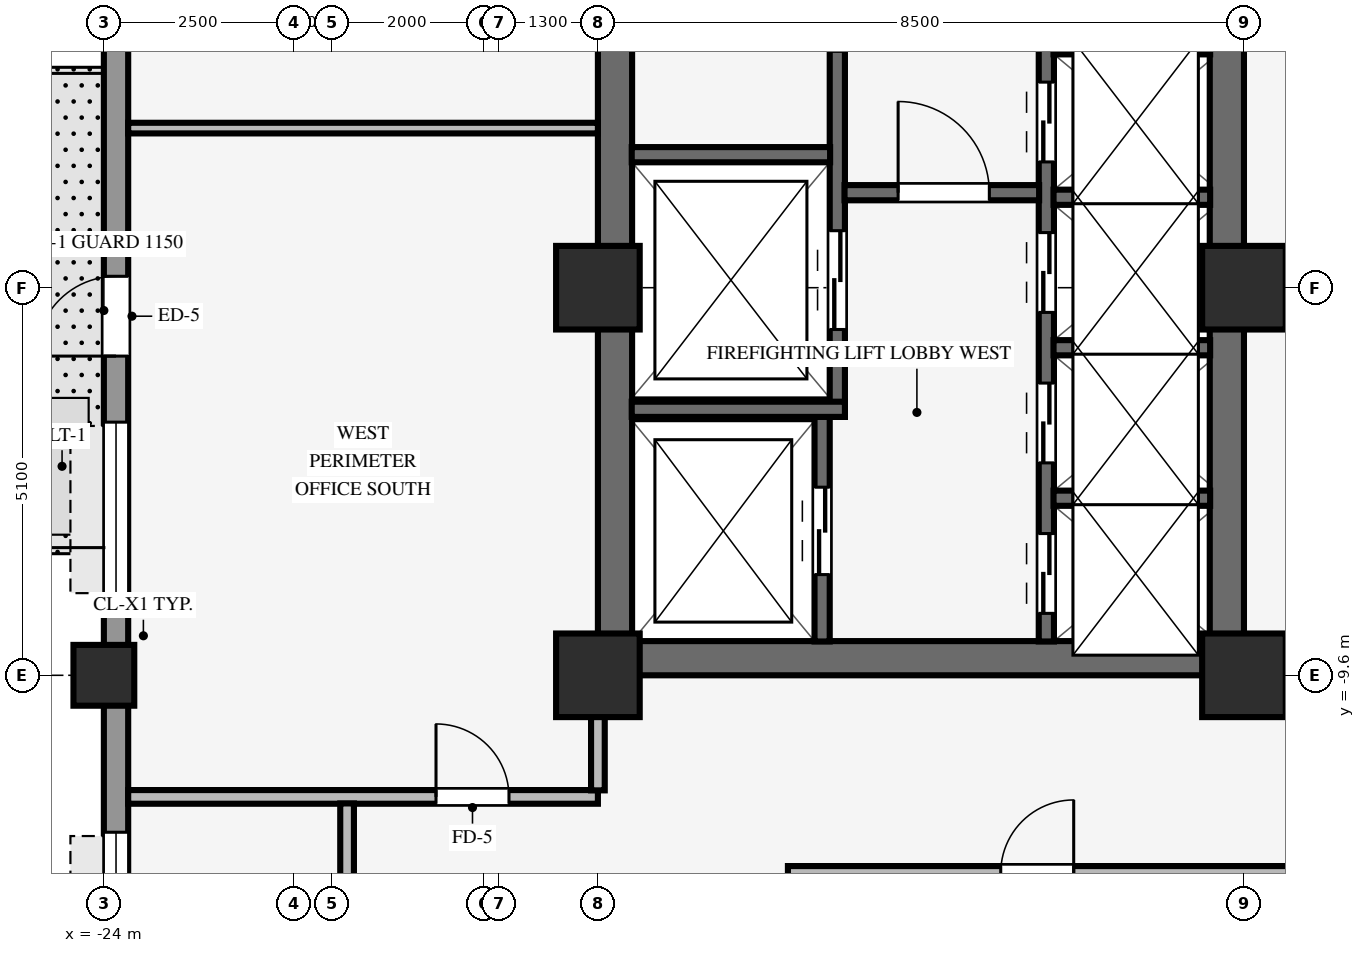
"""IFC4 building model, lengths in metres.
Left out: names, types, materials, properties, quantities, classifications, styles, units other than length and angle.
Written with IfcOpenShell. Run it as: python <this file> out.ifc"""

import sys

from ifc_helpers import new_model, si_unit, direction, frame, frame_2d, origin, origin_2d, place, context, subcontext, project, spatial, rectangle, hollow_rectangle, extrude, source, transform, mapped, element, fill, save


model = new_model("IFC4")
c1 = context("Model", 3, precision=1e-05, world=origin(), true_north=direction((0.0, 1.0)))
c2 = subcontext(c1, "Body", "Model", "MODEL_VIEW")
j1 = project(units=[si_unit("LENGTHUNIT", "METRE"), si_unit("PLANEANGLEUNIT", "RADIAN")], contexts=[c1])
p1 = place(None, origin())
s1 = spatial("IfcSite", under=j1, at=p1, CompositionType="ELEMENT")
p2 = place(p1, origin())
s2 = spatial("IfcBuilding", under=s1, at=p2, CompositionType="ELEMENT")
p3 = place(p2, frame((0.0, 0.0, 89.65)))
s3 = spatial("IfcBuildingStorey", under=s2, at=p3, CompositionType="ELEMENT", Elevation=89.65)
p4 = place(p3, frame((-17.5, -9.375, 0.0), z_axis=(0.0, 0.0, 1.0), x_axis=(1.0, 0.0, 0.0)))
e1 = element("IfcWall", 1, at=p4, inside=s3, PredefinedType="SHEAR", context=c2, shape_type="SweptSolid", body=[
    extrude(rectangle(XDim=8.5, YDim=0.45, at=frame_2d((4.25, 0.0))), origin(), (0.0, 0.0, 1.0), 3.25),
])
p5 = place(p3, frame((-17.275, -9.155, 0.0), z_axis=(0.0, 0.0, 1.0), x_axis=(0.0, 1.0, 0.0)))
e2 = element("IfcWall", 2, at=p5, inside=s3, PredefinedType="SHEAR", context=c2, shape_type="SweptSolid", body=[
    extrude(rectangle(XDim=18.31, YDim=0.45, at=frame_2d((9.155, 0.0))), origin(), (0.0, 0.0, 1.0), 3.25),
])
p6 = place(p3, frame((-9.225, -9.155, 0.0), z_axis=(0.0, 0.0, 1.0), x_axis=(0.0, 1.0, 0.0)))
e3 = element("IfcWall", 3, at=p6, inside=s3, PredefinedType="SHEAR", context=c2, shape_type="SweptSolid", body=[
    extrude(rectangle(XDim=18.31, YDim=0.45, at=frame_2d((9.155, 0.0))), origin(), (0.0, 0.0, 1.0), 3.25),
])
p7 = place(p6, frame((8.555, 0.0, 0.0)))
e4 = element("IfcOpeningElement", 4, at=p7, cuts=e3, PredefinedType="OPENING", context=c2, shape_type="SweptSolid", body=[
    extrude(rectangle(XDim=1.2, YDim=2.15, at=frame_2d((0.6, 1.075))), frame((0.0, 0.235, 0.0), z_axis=(0.0, -1.0, 0.0), x_axis=(1.0, 0.0, 0.0)), (0.0, 0.0, 1.0), 0.47),
])
for number, where, z_axis, x_axis in (
    (5, (-17.5, -9.6, 0.0), (0.0, 0.0, 1.0), (1.0, 0.0, 0.0)),
    (6, (-17.5, -4.5, 0.0), (0.0, 0.0, 1.0), (1.0, 0.0, 0.0)),
    (7, (-9.0, -9.6, 0.0), (0.0, 0.0, 1.0), (1.0, 0.0, 0.0)),
    (8, (-9.0, -4.5, 0.0), (0.0, 0.0, 1.0), (1.0, 0.0, 0.0)),
):
    element("IfcColumn", number, at=place(p3, frame(where, z_axis=z_axis, x_axis=x_axis)), inside=s3, PredefinedType="COLUMN", context=c2, shape_type="SweptSolid", body=[
        extrude(rectangle(XDim=1.1, YDim=1.1, at=origin_2d()), origin(), (0.0, 0.0, 1.0), 3.25),
    ])
p8 = place(p3, frame((-24.0, -9.6, 0.0), z_axis=(0.0, 0.0, 1.0), x_axis=(1.0, 0.0, 0.0)))
e9 = element("IfcColumn", 9, at=p8, inside=s3, PredefinedType="COLUMN", context=c2, shape_type="SweptSolid", body=[
    extrude(hollow_rectangle(XDim=0.8, YDim=0.8, WallThickness=0.055, InnerFilletRadius=0.055, OuterFilletRadius=0.11, at=origin_2d()), origin(), (0.0, 0.0, 1.0), 3.25),
])
p9 = place(p3, frame((-23.84, -20.784, 0.0), z_axis=(0.0, 0.0, 1.0), x_axis=(0.0, 1.0, 0.0)))
e10 = element("IfcWall", 10, at=p9, inside=s3, PredefinedType="STANDARD", context=c2, shape_type="SweptSolid", body=[
    extrude(rectangle(XDim=41.568, YDim=0.32, at=frame_2d((20.784, 0.0))), origin(), (0.0, 0.0, 1.0), 2.585),
])
p10 = place(p9, frame((15.384, 0.0, 0.0)))
e11 = element("IfcOpeningElement", 11, at=p10, cuts=e10, PredefinedType="OPENING", context=c2, shape_type="SweptSolid", body=[
    extrude(rectangle(XDim=1.05, YDim=2.1, at=frame_2d((0.525, 1.05))), frame((0.0, 0.17, 0.0), z_axis=(0.0, -1.0, 0.0), x_axis=(1.0, 0.0, 0.0)), (0.0, 0.0, 1.0), 0.34),
])
p11 = place(p9, frame((6.819, 0.0, 0.8)))
e12 = element("IfcOpeningElement", 12, at=p11, cuts=e10, PredefinedType="OPENING", context=c2, shape_type="SweptSolid", body=[
    extrude(rectangle(XDim=2.3, YDim=1.62, at=frame_2d((1.15, 0.81))), frame((0.0, 0.17, 0.0), z_axis=(0.0, -1.0, 0.0), x_axis=(1.0, 0.0, 0.0)), (0.0, 0.0, 1.0), 0.34),
])
p12 = place(p9, frame((12.215, 0.0, 0.8)))
e13 = element("IfcOpeningElement", 13, at=p12, cuts=e10, PredefinedType="OPENING", context=c2, shape_type="SweptSolid", body=[
    extrude(rectangle(XDim=2.3, YDim=1.62, at=frame_2d((1.15, 0.81))), frame((0.0, 0.17, 0.0), z_axis=(0.0, -1.0, 0.0), x_axis=(1.0, 0.0, 0.0)), (0.0, 0.0, 1.0), 0.34),
])
p13 = place(p9, frame((22.107, 0.0, 0.8)))
e14 = element("IfcOpeningElement", 14, at=p13, cuts=e10, PredefinedType="OPENING", context=c2, shape_type="SweptSolid", body=[
    extrude(rectangle(XDim=2.3, YDim=1.62, at=frame_2d((1.15, 0.81))), frame((0.0, 0.17, 0.0), z_axis=(0.0, -1.0, 0.0), x_axis=(1.0, 0.0, 0.0)), (0.0, 0.0, 1.0), 0.34),
])
p14 = place(p9, frame((27.053, 0.0, 0.8)))
e15 = element("IfcOpeningElement", 15, at=p14, cuts=e10, PredefinedType="OPENING", context=c2, shape_type="SweptSolid", body=[
    extrude(rectangle(XDim=2.3, YDim=1.62, at=frame_2d((1.15, 0.81))), frame((0.0, 0.17, 0.0), z_axis=(0.0, -1.0, 0.0), x_axis=(1.0, 0.0, 0.0)), (0.0, 0.0, 1.0), 0.34),
])
p15 = place(p9, frame((32.449, 0.0, 0.8)))
e16 = element("IfcOpeningElement", 16, at=p15, cuts=e10, PredefinedType="OPENING", context=c2, shape_type="SweptSolid", body=[
    extrude(rectangle(XDim=2.3, YDim=1.62, at=frame_2d((1.15, 0.81))), frame((0.0, 0.17, 0.0), z_axis=(0.0, -1.0, 0.0), x_axis=(1.0, 0.0, 0.0)), (0.0, 0.0, 1.0), 0.34),
])
p16 = place(p3, frame((-14.55, -9.155, 0.0), z_axis=(0.0, 0.0, 1.0), x_axis=(0.0, 1.0, 0.0)))
e17 = element("IfcWall", 17, at=p16, inside=s3, PredefinedType="SHEAR", context=c2, shape_type="SweptSolid", body=[
    extrude(rectangle(XDim=2.96, YDim=0.2, at=frame_2d((1.48, 0.0))), origin(), (0.0, 0.0, 1.0), 3.25),
])
p17 = place(p16, frame((0.88, 0.0, 0.0)))
e18 = element("IfcOpeningElement", 18, at=p17, cuts=e17, PredefinedType="OPENING", context=c2, shape_type="SweptSolid", body=[
    extrude(rectangle(XDim=1.15, YDim=2.15, at=frame_2d((0.575, 1.075))), frame((0.0, 0.11, 0.0), z_axis=(0.0, -1.0, 0.0), x_axis=(1.0, 0.0, 0.0)), (0.0, 0.0, 1.0), 0.22),
])
p18 = place(p3, frame((-14.35, -6.2, 0.0), z_axis=(0.0, 0.0, 1.0), x_axis=(0.0, 1.0, 0.0)))
e19 = element("IfcWall", 19, at=p18, inside=s3, PredefinedType="SHEAR", context=c2, shape_type="SweptSolid", body=[
    extrude(rectangle(XDim=7.105, YDim=0.2, at=frame_2d((3.552, 0.0))), origin(), (0.0, 0.0, 1.0), 3.25),
])
p19 = place(p18, frame((5.69, 0.0, 0.0), z_axis=(0.0, 0.0, 1.0), x_axis=(-1.0, 0.0, 0.0)))
e20 = element("IfcOpeningElement", 20, at=p19, cuts=e19, PredefinedType="OPENING", context=c2, shape_type="SweptSolid", body=[
    extrude(rectangle(XDim=0.88, YDim=2.1, at=frame_2d((0.44, 1.05))), frame((0.0, 0.11, 0.0), z_axis=(0.0, -1.0, 0.0), x_axis=(1.0, 0.0, 0.0)), (0.0, 0.0, 1.0), 0.22),
])
p20 = place(p18, frame((1.15, 0.0, 0.0)))
e21 = element("IfcOpeningElement", 21, at=p20, cuts=e19, PredefinedType="OPENING", context=c2, shape_type="SweptSolid", body=[
    extrude(rectangle(XDim=1.3, YDim=2.2, at=frame_2d((0.65, 1.1))), frame((0.0, 0.11, 0.0), z_axis=(0.0, -1.0, 0.0), x_axis=(1.0, 0.0, 0.0)), (0.0, 0.0, 1.0), 0.22),
])
p21 = place(p3, frame((-17.055, -6.1, 0.0), z_axis=(0.0, 0.0, 1.0), x_axis=(1.0, 0.0, 0.0)))
e22 = element("IfcWall", 22, at=p21, inside=s3, PredefinedType="SHEAR", context=c2, shape_type="SweptSolid", body=[
    extrude(rectangle(XDim=2.805, YDim=0.2, at=frame_2d((1.402, 0.0))), origin(), (0.0, 0.0, 1.0), 3.25),
])
p22 = place(p3, frame((-17.055, -2.75, 0.0), z_axis=(0.0, 0.0, 1.0), x_axis=(1.0, 0.0, 0.0)))
e23 = element("IfcWall", 23, at=p22, inside=s3, PredefinedType="SHEAR", context=c2, shape_type="SweptSolid", body=[
    extrude(rectangle(XDim=2.61, YDim=0.2, at=frame_2d((1.305, 0.0))), origin(), (0.0, 0.0, 1.0), 3.25),
])
p23 = place(p3, frame((-11.6, -9.155, 0.0), z_axis=(0.0, 0.0, 1.0), x_axis=(0.0, 1.0, 0.0)))
e24 = element("IfcWall", 24, at=p23, inside=s3, PredefinedType="SHEAR", context=c2, shape_type="SweptSolid", body=[
    extrude(rectangle(XDim=7.925, YDim=0.2, at=frame_2d((3.962, 0.0))), origin(), (0.0, 0.0, 1.0), 3.25),
])
p24 = place(p23, frame((0.37, 0.0, 0.0)))
e25 = element("IfcOpeningElement", 25, at=p24, cuts=e24, PredefinedType="OPENING", context=c2, shape_type="SweptSolid", body=[
    extrude(rectangle(XDim=1.05, YDim=2.15, at=frame_2d((0.525, 1.075))), frame((0.0, 0.11, 0.0), z_axis=(0.0, -1.0, 0.0), x_axis=(1.0, 0.0, 0.0)), (0.0, 0.0, 1.0), 0.22),
])
p25 = place(p23, frame((2.35, 0.0, 0.0)))
e26 = element("IfcOpeningElement", 26, at=p25, cuts=e24, PredefinedType="OPENING", context=c2, shape_type="SweptSolid", body=[
    extrude(rectangle(XDim=1.05, YDim=2.15, at=frame_2d((0.525, 1.075))), frame((0.0, 0.11, 0.0), z_axis=(0.0, -1.0, 0.0), x_axis=(1.0, 0.0, 0.0)), (0.0, 0.0, 1.0), 0.22),
])
p26 = place(p23, frame((4.33, 0.0, 0.0)))
e27 = element("IfcOpeningElement", 27, at=p26, cuts=e24, PredefinedType="OPENING", context=c2, shape_type="SweptSolid", body=[
    extrude(rectangle(XDim=1.05, YDim=2.15, at=frame_2d((0.525, 1.075))), frame((0.0, 0.11, 0.0), z_axis=(0.0, -1.0, 0.0), x_axis=(1.0, 0.0, 0.0)), (0.0, 0.0, 1.0), 0.22),
])
p27 = place(p23, frame((6.31, 0.0, 0.0)))
e28 = element("IfcOpeningElement", 28, at=p27, cuts=e24, PredefinedType="OPENING", context=c2, shape_type="SweptSolid", body=[
    extrude(rectangle(XDim=1.05, YDim=2.15, at=frame_2d((0.525, 1.075))), frame((0.0, 0.11, 0.0), z_axis=(0.0, -1.0, 0.0), x_axis=(1.0, 0.0, 0.0)), (0.0, 0.0, 1.0), 0.22),
])
p28 = place(p3, frame((-14.255, -3.25, 0.0), z_axis=(0.0, 0.0, 1.0), x_axis=(1.0, 0.0, 0.0)))
e29 = element("IfcWall", 29, at=p28, inside=s3, PredefinedType="SHEAR", context=c2, shape_type="SweptSolid", body=[
    extrude(rectangle(XDim=2.56, YDim=0.2, at=frame_2d((1.28, 0.0))), origin(), (0.0, 0.0, 1.0), 3.25),
])
p29 = place(p28, frame((0.705, 0.0, 0.0)))
e30 = element("IfcOpeningElement", 30, at=p29, cuts=e29, PredefinedType="OPENING", context=c2, shape_type="SweptSolid", body=[
    extrude(rectangle(XDim=1.2, YDim=2.15, at=frame_2d((0.6, 1.075))), frame((0.0, 0.11, 0.0), z_axis=(0.0, -1.0, 0.0), x_axis=(1.0, 0.0, 0.0)), (0.0, 0.0, 1.0), 0.22),
])
for number, where, z_axis, x_axis in (
    (31, (-11.505, -7.27, 0.0), (0.0, 0.0, 1.0), (1.0, 0.0, 0.0)),
    (32, (-11.505, -5.29, 0.0), (0.0, 0.0, 1.0), (1.0, 0.0, 0.0)),
    (33, (-11.505, -3.31, 0.0), (0.0, 0.0, 1.0), (1.0, 0.0, 0.0)),
    (34, (-11.505, -1.33, 0.0), (0.0, 0.0, 1.0), (1.0, 0.0, 0.0)),
):
    element("IfcWall", number, at=place(p3, frame(where, z_axis=z_axis, x_axis=x_axis)), inside=s3, PredefinedType="SHEAR", context=c2, shape_type="SweptSolid", body=[
        extrude(rectangle(XDim=2.06, YDim=0.2, at=frame_2d((1.03, 0.0))), origin(), (0.0, 0.0, 1.0), 3.25),
    ])
p30 = place(p3, frame((-15.0, -12.2, 0.0), z_axis=(0.0, 0.0, 1.0), x_axis=(1.0, 0.0, 0.0)))
e35 = element("IfcWall", 35, at=p30, inside=s3, PredefinedType="PARTITIONING", context=c2, shape_type="SweptSolid", body=[
    extrude(rectangle(XDim=23.8, YDim=0.18, at=frame_2d((11.9, 0.0))), origin(), (0.0, 0.0, 1.0), 3.24),
])
p31 = place(p30, frame((7.325, 0.0, 0.0)))
e36 = element("IfcOpeningElement", 36, at=p31, cuts=e35, PredefinedType="OPENING", context=c2, shape_type="SweptSolid", body=[
    extrude(rectangle(XDim=0.96, YDim=2.1, at=frame_2d((0.48, 1.05))), frame((0.0, 0.1, 0.0), z_axis=(0.0, -1.0, 0.0), x_axis=(1.0, 0.0, 0.0)), (0.0, 0.0, 1.0), 0.2),
])
p32 = place(p30, frame((2.8, 0.0, 0.0)))
e37 = element("IfcOpeningElement", 37, at=p32, cuts=e35, PredefinedType="OPENING", context=c2, shape_type="SweptSolid", body=[
    extrude(rectangle(XDim=0.96, YDim=2.1, at=frame_2d((0.48, 1.05))), frame((0.0, 0.1, 0.0), z_axis=(0.0, -1.0, 0.0), x_axis=(1.0, 0.0, 0.0)), (0.0, 0.0, 1.0), 0.2),
])
p33 = place(p30, frame((19.65, 0.0, 0.0)))
e38 = element("IfcOpeningElement", 38, at=p33, cuts=e35, PredefinedType="OPENING", context=c2, shape_type="SweptSolid", body=[
    extrude(rectangle(XDim=0.9, YDim=2.1, at=frame_2d((0.45, 1.05))), frame((0.0, 0.1, 0.0), z_axis=(0.0, -1.0, 0.0), x_axis=(1.0, 0.0, 0.0)), (0.0, 0.0, 1.0), 0.2),
])
p34 = place(p30, frame((17.05, 0.0, 0.0)))
e39 = element("IfcOpeningElement", 39, at=p34, cuts=e35, PredefinedType="OPENING", context=c2, shape_type="SweptSolid", body=[
    extrude(rectangle(XDim=0.9, YDim=2.1, at=frame_2d((0.45, 1.05))), frame((0.0, 0.1, 0.0), z_axis=(0.0, -1.0, 0.0), x_axis=(1.0, 0.0, 0.0)), (0.0, 0.0, 1.0), 0.2),
])
p35 = place(p30, frame((22.15, 0.0, 0.0)))
e40 = element("IfcOpeningElement", 40, at=p35, cuts=e35, PredefinedType="OPENING", context=c2, shape_type="SweptSolid", body=[
    extrude(rectangle(XDim=0.9, YDim=2.1, at=frame_2d((0.45, 1.05))), frame((0.0, 0.1, 0.0), z_axis=(0.0, -1.0, 0.0), x_axis=(1.0, 0.0, 0.0)), (0.0, 0.0, 1.0), 0.2),
])
p36 = place(p30, frame((12.52, 0.0, 0.0)))
e41 = element("IfcOpeningElement", 41, at=p36, cuts=e35, PredefinedType="OPENING", context=c2, shape_type="SweptSolid", body=[
    extrude(rectangle(XDim=0.96, YDim=2.1, at=frame_2d((0.48, 1.05))), frame((0.0, 0.1, 0.0), z_axis=(0.0, -1.0, 0.0), x_axis=(1.0, 0.0, 0.0)), (0.0, 0.0, 1.0), 0.2),
])
p37 = place(p30, frame((14.72, 0.0, 0.0)))
e42 = element("IfcOpeningElement", 42, at=p37, cuts=e35, PredefinedType="OPENING", context=c2, shape_type="SweptSolid", body=[
    extrude(rectangle(XDim=0.96, YDim=2.1, at=frame_2d((0.48, 1.05))), frame((0.0, 0.1, 0.0), z_axis=(0.0, -1.0, 0.0), x_axis=(1.0, 0.0, 0.0)), (0.0, 0.0, 1.0), 0.2),
])
p38 = place(p3, frame((-23.68, -11.2, 0.0), z_axis=(0.0, 0.0, 1.0), x_axis=(1.0, 0.0, 0.0)))
e43 = element("IfcWall", 43, at=p38, inside=s3, PredefinedType="PARTITIONING", context=c2, shape_type="SweptSolid", body=[
    extrude(rectangle(XDim=6.18, YDim=0.18, at=frame_2d((3.09, 0.0))), origin(), (0.0, 0.0, 1.0), 3.24),
])
p39 = place(p38, frame((4.05, 0.0, 0.0)))
e44 = element("IfcOpeningElement", 44, at=p39, cuts=e43, PredefinedType="OPENING", context=c2, shape_type="SweptSolid", body=[
    extrude(rectangle(XDim=0.96, YDim=2.1, at=frame_2d((0.48, 1.05))), frame((0.0, 0.1, 0.0), z_axis=(0.0, -1.0, 0.0), x_axis=(1.0, 0.0, 0.0)), (0.0, 0.0, 1.0), 0.2),
])
p40 = place(p3, frame((-8.454, -9.6, 0.0), z_axis=(0.0, 0.0, 1.0), x_axis=(1.0, 0.0, 0.0)))
e45 = element("IfcWall", 45, at=p40, inside=s3, PredefinedType="PARTITIONING", context=c2, shape_type="SweptSolid", body=[
    extrude(rectangle(XDim=5.254, YDim=0.18, at=frame_2d((2.627, 0.0))), origin(), (0.0, 0.0, 1.0), 2.285),
])
p41 = place(p3, frame((-23.68, -2.4, 0.0), z_axis=(0.0, 0.0, 1.0), x_axis=(1.0, 0.0, 0.0)))
e46 = element("IfcWall", 46, at=p41, inside=s3, PredefinedType="PARTITIONING", context=c2, shape_type="SweptSolid", body=[
    extrude(rectangle(XDim=6.18, YDim=0.14, at=frame_2d((3.09, 0.0))), origin(), (0.0, 0.0, 1.0), 3.24),
])
p42 = place(p3, frame((-20.8, -13.514, 0.0), z_axis=(0.0, 0.0, 1.0), x_axis=(0.0, 1.0, 0.0)))
e47 = element("IfcWall", 47, at=p42, inside=s3, PredefinedType="PARTITIONING", context=c2, shape_type="SweptSolid", body=[
    extrude(rectangle(XDim=2.228, YDim=0.18, at=frame_2d((1.114, 0.0))), origin(), (0.0, 0.0, 1.0), 3.24),
])
p43 = place(p3, frame((-17.5, -11.114, 0.0), z_axis=(0.0, 0.0, 1.0), x_axis=(0.0, 1.0, 0.0)))
e48 = element("IfcWall", 48, at=p43, inside=s3, PredefinedType="PARTITIONING", context=c2, shape_type="SweptSolid", body=[
    extrude(rectangle(XDim=0.968, YDim=0.18, at=frame_2d((0.484, 0.0))), origin(), (0.0, 0.0, 1.0), 2.335),
])
m1 = source(origin(), c2, "Body", "SweptSolid", [
    extrude(rectangle(XDim=1.05, YDim=2.1, at=frame_2d((0.525, 1.05))), frame((0.0, 0.025, 0.0), z_axis=(0.0, -1.0, 0.0), x_axis=(1.0, 0.0, 0.0)), (0.0, 0.0, 1.0), 0.05),
])
p44 = place(p10, origin())
e49 = element("IfcDoor", 49, at=p44, inside=s3, OperationType="SINGLE_SWING_LEFT", PredefinedType="DOOR", context=c2, shape_type="MappedRepresentation", body=[
    mapped(m1, transform((0.0, 0.0, 0.0), scale=1.0)),
])
fill(e11, e49)
m2 = source(origin(), c2, "Body", "SweptSolid", [
    extrude(rectangle(XDim=2.3, YDim=1.62, at=frame_2d((1.15, 0.81))), frame((0.0, 0.03, 0.0), z_axis=(0.0, -1.0, 0.0), x_axis=(1.0, 0.0, 0.0)), (0.0, 0.0, 1.0), 0.06),
])
p45 = place(p11, origin())
e50 = element("IfcWindow", 50, at=p45, inside=s3, PartitioningType="SINGLE_PANEL", PredefinedType="WINDOW", context=c2, shape_type="MappedRepresentation", body=[
    mapped(m2, transform((0.0, 0.0, 0.0), scale=1.0)),
])
fill(e12, e50)
p46 = place(p12, origin())
e51 = element("IfcWindow", 51, at=p46, inside=s3, PartitioningType="SINGLE_PANEL", PredefinedType="WINDOW", context=c2, shape_type="MappedRepresentation", body=[
    mapped(m2, transform((0.0, 0.0, 0.0), scale=1.0)),
])
fill(e13, e51)
m3 = source(origin(), c2, "Body", "SweptSolid", [
    extrude(rectangle(XDim=1.2, YDim=2.15, at=frame_2d((0.6, 1.075))), frame((0.0, 0.025, 0.0), z_axis=(0.0, -1.0, 0.0), x_axis=(1.0, 0.0, 0.0)), (0.0, 0.0, 1.0), 0.05),
])
p47 = place(p29, origin())
e52 = element("IfcDoor", 52, at=p47, inside=s3, OperationType="SINGLE_SWING_LEFT", PredefinedType="DOOR", context=c2, shape_type="MappedRepresentation", body=[
    mapped(m3, transform((0.0, 0.0, 0.0), scale=1.0)),
])
fill(e30, e52)
m4 = source(origin(), c2, "Body", "SweptSolid", [
    extrude(rectangle(XDim=1.15, YDim=2.15, at=frame_2d((0.575, 1.075))), frame((0.0, 0.025, 0.0), z_axis=(0.0, -1.0, 0.0), x_axis=(1.0, 0.0, 0.0)), (0.0, 0.0, 1.0), 0.05),
])
p48 = place(p17, origin())
e53 = element("IfcDoor", 53, at=p48, inside=s3, OperationType="DOUBLE_DOOR_SLIDING", PredefinedType="DOOR", context=c2, shape_type="MappedRepresentation", body=[
    mapped(m4, transform((0.0, 0.0, 0.0), scale=1.0)),
])
fill(e18, e53)
m5 = source(origin(), c2, "Body", "SweptSolid", [
    extrude(rectangle(XDim=1.3, YDim=2.2, at=frame_2d((0.65, 1.1))), frame((0.0, 0.025, 0.0), z_axis=(0.0, -1.0, 0.0), x_axis=(1.0, 0.0, 0.0)), (0.0, 0.0, 1.0), 0.05),
])
p49 = place(p20, origin())
e54 = element("IfcDoor", 54, at=p49, inside=s3, OperationType="DOUBLE_DOOR_SLIDING", PredefinedType="DOOR", context=c2, shape_type="MappedRepresentation", body=[
    mapped(m5, transform((0.0, 0.0, 0.0), scale=1.0)),
])
fill(e21, e54)
m6 = source(origin(), c2, "Body", "SweptSolid", [
    extrude(rectangle(XDim=1.05, YDim=2.15, at=frame_2d((0.525, 1.075))), frame((0.0, 0.025, 0.0), z_axis=(0.0, -1.0, 0.0), x_axis=(1.0, 0.0, 0.0)), (0.0, 0.0, 1.0), 0.05),
])
p50 = place(p24, origin())
e55 = element("IfcDoor", 55, at=p50, inside=s3, OperationType="DOUBLE_DOOR_SLIDING", PredefinedType="DOOR", context=c2, shape_type="MappedRepresentation", body=[
    mapped(m6, transform((0.0, 0.0, 0.0), scale=1.0)),
])
fill(e25, e55)
p51 = place(p25, origin())
e56 = element("IfcDoor", 56, at=p51, inside=s3, OperationType="DOUBLE_DOOR_SLIDING", PredefinedType="DOOR", context=c2, shape_type="MappedRepresentation", body=[
    mapped(m6, transform((0.0, 0.0, 0.0), scale=1.0)),
])
fill(e26, e56)
p52 = place(p26, origin())
e57 = element("IfcDoor", 57, at=p52, inside=s3, OperationType="DOUBLE_DOOR_SLIDING", PredefinedType="DOOR", context=c2, shape_type="MappedRepresentation", body=[
    mapped(m6, transform((0.0, 0.0, 0.0), scale=1.0)),
])
fill(e27, e57)
p53 = place(p27, origin())
e58 = element("IfcDoor", 58, at=p53, inside=s3, OperationType="DOUBLE_DOOR_SLIDING", PredefinedType="DOOR", context=c2, shape_type="MappedRepresentation", body=[
    mapped(m6, transform((0.0, 0.0, 0.0), scale=1.0)),
])
fill(e28, e58)
m7 = source(origin(), c2, "Body", "SweptSolid", [
    extrude(rectangle(XDim=0.96, YDim=2.1, at=frame_2d((0.48, 1.05))), frame((0.0, 0.025, 0.0), z_axis=(0.0, -1.0, 0.0), x_axis=(1.0, 0.0, 0.0)), (0.0, 0.0, 1.0), 0.05),
])
p54 = place(p32, origin())
e59 = element("IfcDoor", 59, at=p54, inside=s3, OperationType="SINGLE_SWING_RIGHT", PredefinedType="DOOR", context=c2, shape_type="MappedRepresentation", body=[
    mapped(m7, transform((0.0, 0.0, 0.0), scale=1.0)),
])
fill(e37, e59)
p55 = place(p39, origin())
e60 = element("IfcDoor", 60, at=p55, inside=s3, OperationType="SINGLE_SWING_LEFT", PredefinedType="DOOR", context=c2, shape_type="MappedRepresentation", body=[
    mapped(m7, transform((0.0, 0.0, 0.0), scale=1.0)),
])
fill(e44, e60)
save(model, sys.argv[1])
